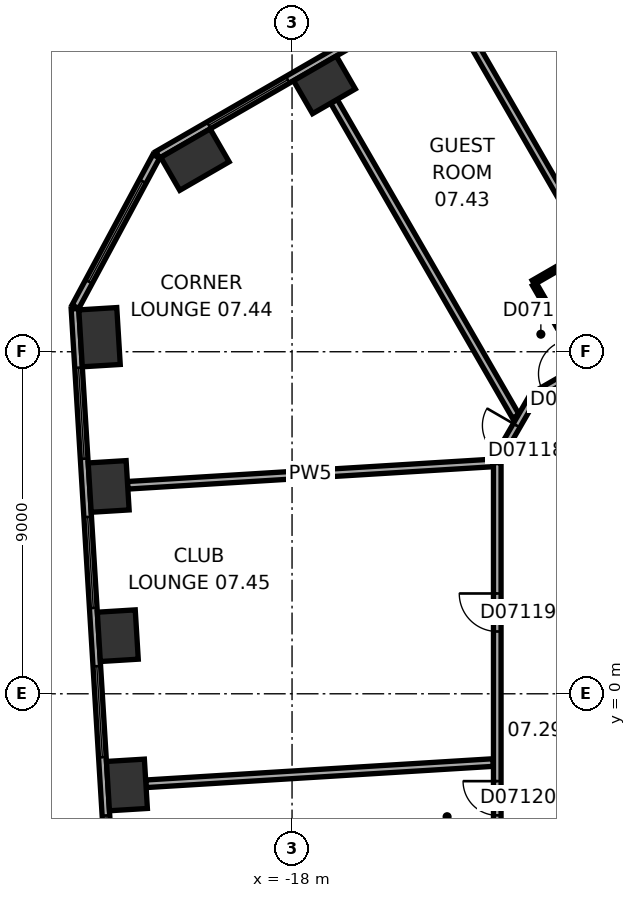
"""IFC4 building model, lengths in metres.
Left out: names, types, materials, properties, quantities, classifications, styles, units other than length and angle.
Written with IfcOpenShell. Run it as: python <this file> out.ifc"""

import sys

from ifc_helpers import new_model, si_unit, direction, frame, frame_2d, origin, origin_2d, place, context, subcontext, project, spatial, rectangle, extrude, element, fill, save


model = new_model("IFC4")
c1 = context("Model", 3, precision=1e-05, world=origin(), true_north=direction((0.0, 1.0)))
c2 = subcontext(c1, "Body", "Model", "MODEL_VIEW")
j1 = project(units=[si_unit("LENGTHUNIT", "METRE"), si_unit("PLANEANGLEUNIT", "RADIAN")], contexts=[c1])
p1 = place(None, origin())
s1 = spatial("IfcSite", under=j1, at=p1, CompositionType="ELEMENT")
p2 = place(p1, origin())
s2 = spatial("IfcBuilding", under=s1, at=p2, CompositionType="ELEMENT")
p3 = place(p2, frame((0.0, 0.0, 44.0)))
s3 = spatial("IfcBuildingStorey", under=s2, at=p3, CompositionType="ELEMENT", Elevation=44.0)
p4 = place(p3, frame((-17.148, 16.023, 0.0), z_axis=(0.0, 0.0, 1.0), x_axis=(-0.866025403784, -0.5, 0.0)))
e1 = element("IfcColumn", 1, at=p4, inside=s3, PredefinedType="COLUMN", context=c2, shape_type="SweptSolid", body=[
    extrude(rectangle(XDim=1.3, YDim=1.0, at=origin_2d()), origin(), (0.0, 0.0, 1.0), 3.3),
])
for number, where, z_axis, x_axis in (
    (2, (-20.555, 14.055, 0.0), (0.0, 0.0, 1.0), (-0.866, -0.5, 0.0)),
    (3, (-23.066, 9.383, 0.0), (0.0, 0.0, 1.0), (0.061, -0.998, 0.0)),
):
    element("IfcColumn", number, at=place(p3, frame(where, z_axis=z_axis, x_axis=x_axis)), inside=s3, PredefinedType="COLUMN", context=c2, shape_type="SweptSolid", body=[
        extrude(rectangle(XDim=1.5, YDim=1.0, at=origin_2d()), origin(), (0.0, 0.0, 1.0), 3.3),
    ])
for number, where, z_axis, x_axis in (
    (4, (-22.826, 5.456, 0.0), (0.0, 0.0, 1.0), (0.061, -0.998, 0.0)),
    (5, (-22.585, 1.529, 0.0), (0.0, 0.0, 1.0), (0.061, -0.998, 0.0)),
    (6, (-22.345, -2.399, 0.0), (0.0, 0.0, 1.0), (0.061, -0.998, 0.0)),
):
    element("IfcColumn", number, at=place(p3, frame(where, z_axis=z_axis, x_axis=x_axis)), inside=s3, PredefinedType="COLUMN", context=c2, shape_type="SweptSolid", body=[
        extrude(rectangle(XDim=1.3, YDim=1.0, at=origin_2d()), origin(), (0.0, 0.0, 1.0), 3.3),
    ])
p5 = place(p3, frame((-3.136, 24.805, 0.0), z_axis=(0.0, 0.0, 1.0), x_axis=(-0.866028291626, -0.499994998079, 0.0)))
e7 = element("IfcWall", 7, at=p5, inside=s3, PredefinedType="STANDARD", context=c2, shape_type="SweptSolid", body=[
    extrude(rectangle(XDim=21.246, YDim=0.2, at=frame_2d((10.623, 0.0))), origin(), (0.0, 0.0, 1.0), 3.3),
])
p6 = place(p5, frame((1.555, 0.0, 0.8)))
e8 = element("IfcOpeningElement", 8, at=p6, cuts=e7, PredefinedType="OPENING", context=c2, shape_type="SweptSolid", body=[
    extrude(rectangle(XDim=2.4, YDim=1.7, at=frame_2d((1.2, 0.85))), frame((0.0, 0.11, 0.0), z_axis=(0.0, -1.0, 0.0), x_axis=(1.0, 0.0, 0.0)), (0.0, 0.0, 1.0), 0.22),
])
p7 = place(p5, frame((5.489, 0.0, 0.8)))
e9 = element("IfcOpeningElement", 9, at=p7, cuts=e7, PredefinedType="OPENING", context=c2, shape_type="SweptSolid", body=[
    extrude(rectangle(XDim=2.4, YDim=1.7, at=frame_2d((1.2, 0.85))), frame((0.0, 0.11, 0.0), z_axis=(0.0, -1.0, 0.0), x_axis=(1.0, 0.0, 0.0)), (0.0, 0.0, 1.0), 0.22),
])
p8 = place(p5, frame((9.424, 0.0, 0.8)))
e10 = element("IfcOpeningElement", 10, at=p8, cuts=e7, PredefinedType="OPENING", context=c2, shape_type="SweptSolid", body=[
    extrude(rectangle(XDim=2.4, YDim=1.7, at=frame_2d((1.2, 0.85))), frame((0.0, 0.11, 0.0), z_axis=(0.0, -1.0, 0.0), x_axis=(1.0, 0.0, 0.0)), (0.0, 0.0, 1.0), 0.22),
])
p9 = place(p5, frame((13.358, 0.0, 0.8)))
e11 = element("IfcOpeningElement", 11, at=p9, cuts=e7, PredefinedType="OPENING", context=c2, shape_type="SweptSolid", body=[
    extrude(rectangle(XDim=2.4, YDim=1.7, at=frame_2d((1.2, 0.85))), frame((0.0, 0.11, 0.0), z_axis=(0.0, -1.0, 0.0), x_axis=(1.0, 0.0, 0.0)), (0.0, 0.0, 1.0), 0.22),
])
p10 = place(p5, frame((17.293, 0.0, 0.8)))
e12 = element("IfcOpeningElement", 12, at=p10, cuts=e7, PredefinedType="OPENING", context=c2, shape_type="SweptSolid", body=[
    extrude(rectangle(XDim=2.4, YDim=1.7, at=frame_2d((1.2, 0.85))), frame((0.0, 0.11, 0.0), z_axis=(0.0, -1.0, 0.0), x_axis=(1.0, 0.0, 0.0)), (0.0, 0.0, 1.0), 0.22),
])
p11 = place(p3, frame((-21.574, 14.143, 0.0), z_axis=(0.0, 0.0, 1.0), x_axis=(-0.473292949472, -0.880905093628, 0.0)))
e13 = element("IfcWall", 13, at=p11, inside=s3, PredefinedType="STANDARD", context=c2, shape_type="SweptSolid", body=[
    extrude(rectangle(XDim=4.494, YDim=0.2, at=frame_2d((2.247, 0.0))), origin(), (0.0, 0.0, 1.0), 3.3),
])
p12 = place(p11, frame((0.747, 0.0, 0.8)))
e14 = element("IfcOpeningElement", 14, at=p12, cuts=e13, PredefinedType="OPENING", context=c2, shape_type="SweptSolid", body=[
    extrude(rectangle(XDim=3.0, YDim=1.7, at=frame_2d((1.5, 0.85))), frame((0.0, 0.11, 0.0), z_axis=(0.0, -1.0, 0.0), x_axis=(1.0, 0.0, 0.0)), (0.0, 0.0, 1.0), 0.22),
])
p13 = place(p3, frame((-23.713, 10.131, 0.0), z_axis=(0.0, 0.0, 1.0), x_axis=(0.061040439785, -0.998135293791, 0.0)))
e15 = element("IfcWall", 15, at=p13, inside=s3, PredefinedType="STANDARD", context=c2, shape_type="SweptSolid", body=[
    extrude(rectangle(XDim=21.246, YDim=0.2, at=frame_2d((10.623, 0.0))), origin(), (0.0, 0.0, 1.0), 3.3),
])
p14 = place(p13, frame((1.553, 0.0, 0.8)))
e16 = element("IfcOpeningElement", 16, at=p14, cuts=e15, PredefinedType="OPENING", context=c2, shape_type="SweptSolid", body=[
    extrude(rectangle(XDim=2.4, YDim=1.7, at=frame_2d((1.2, 0.85))), frame((0.0, 0.11, 0.0), z_axis=(0.0, -1.0, 0.0), x_axis=(1.0, 0.0, 0.0)), (0.0, 0.0, 1.0), 0.22),
])
p15 = place(p13, frame((5.488, 0.0, 0.8)))
e17 = element("IfcOpeningElement", 17, at=p15, cuts=e15, PredefinedType="OPENING", context=c2, shape_type="SweptSolid", body=[
    extrude(rectangle(XDim=2.4, YDim=1.7, at=frame_2d((1.2, 0.85))), frame((0.0, 0.11, 0.0), z_axis=(0.0, -1.0, 0.0), x_axis=(1.0, 0.0, 0.0)), (0.0, 0.0, 1.0), 0.22),
])
p16 = place(p13, frame((9.422, 0.0, 0.8)))
e18 = element("IfcOpeningElement", 18, at=p16, cuts=e15, PredefinedType="OPENING", context=c2, shape_type="SweptSolid", body=[
    extrude(rectangle(XDim=2.4, YDim=1.7, at=frame_2d((1.2, 0.85))), frame((0.0, 0.11, 0.0), z_axis=(0.0, -1.0, 0.0), x_axis=(1.0, 0.0, 0.0)), (0.0, 0.0, 1.0), 0.22),
])
p17 = place(p13, frame((13.357, 0.0, 0.8)))
e19 = element("IfcOpeningElement", 19, at=p17, cuts=e15, PredefinedType="OPENING", context=c2, shape_type="SweptSolid", body=[
    extrude(rectangle(XDim=2.4, YDim=1.7, at=frame_2d((1.2, 0.85))), frame((0.0, 0.11, 0.0), z_axis=(0.0, -1.0, 0.0), x_axis=(1.0, 0.0, 0.0)), (0.0, 0.0, 1.0), 0.22),
])
p18 = place(p13, frame((17.292, 0.0, 0.8)))
e20 = element("IfcOpeningElement", 20, at=p18, cuts=e15, PredefinedType="OPENING", context=c2, shape_type="SweptSolid", body=[
    extrude(rectangle(XDim=2.4, YDim=1.7, at=frame_2d((1.2, 0.85))), frame((0.0, 0.11, 0.0), z_axis=(0.0, -1.0, 0.0), x_axis=(1.0, 0.0, 0.0)), (0.0, 0.0, 1.0), 0.22),
])
p19 = place(p3, frame((-22.327, 5.486, 0.0), z_axis=(0.0, 0.0, 1.0), x_axis=(0.998135194863, 0.061042057435, 0.0)))
e21 = element("IfcWall", 21, at=p19, inside=s3, PredefinedType="PARTITIONING", context=c2, shape_type="SweptSolid", body=[
    extrude(rectangle(XDim=9.635, YDim=0.2, at=frame_2d((4.817, 0.0))), origin(), (0.0, 0.0, 1.0), 3.05),
])
p20 = place(p3, frame((-21.846, -2.368, 0.0), z_axis=(0.0, 0.0, 1.0), x_axis=(0.998134617584, 0.061051496129, 0.0)))
e22 = element("IfcWall", 22, at=p20, inside=s3, PredefinedType="PARTITIONING", context=c2, shape_type="SweptSolid", body=[
    extrude(rectangle(XDim=9.154, YDim=0.2, at=frame_2d((4.577, 0.0))), origin(), (0.0, 0.0, 1.0), 3.05),
])
p21 = place(p3, frame((-16.898, 15.59, 0.0), z_axis=(0.0, 0.0, 1.0), x_axis=(0.500023458698, -0.866011859475, 0.0)))
e23 = element("IfcWall", 23, at=p21, inside=s3, PredefinedType="PARTITIONING", context=c2, shape_type="SweptSolid", body=[
    extrude(rectangle(XDim=9.572, YDim=0.2, at=frame_2d((4.786, 0.0))), origin(), (0.0, 0.0, 1.0), 3.05),
])
p22 = place(p3, frame((-12.6, 6.081, 0.0), z_axis=(0.0, 0.0, 1.0), x_axis=(0.0, -1.0, 0.0)))
e24 = element("IfcWall", 24, at=p22, inside=s3, PredefinedType="PARTITIONING", context=c2, shape_type="SweptSolid", body=[
    extrude(rectangle(XDim=12.219, YDim=0.2, at=frame_2d((6.109, 0.0))), origin(), (0.0, 0.0, 1.0), 3.05),
])
p23 = place(p22, frame((3.442, 0.0, 0.0)))
e25 = element("IfcOpeningElement", 25, at=p23, cuts=e24, PredefinedType="OPENING", context=c2, shape_type="SweptSolid", body=[
    extrude(rectangle(XDim=1.0, YDim=2.1, at=frame_2d((0.5, 1.05))), frame((0.0, 0.11, 0.0), z_axis=(0.0, -1.0, 0.0), x_axis=(1.0, 0.0, 0.0)), (0.0, 0.0, 1.0), 0.22),
])
p24 = place(p22, frame((8.38, 0.0, 0.0)))
e26 = element("IfcOpeningElement", 26, at=p24, cuts=e24, PredefinedType="OPENING", context=c2, shape_type="SweptSolid", body=[
    extrude(rectangle(XDim=0.9, YDim=2.1, at=frame_2d((0.45, 1.05))), frame((0.0, 0.11, 0.0), z_axis=(0.0, -1.0, 0.0), x_axis=(1.0, 0.0, 0.0)), (0.0, 0.0, 1.0), 0.22),
])
p25 = place(p3, frame((-11.65, 7.823, 0.0), z_axis=(0.0, 0.0, 1.0), x_axis=(-0.500063520245, -0.865988727248, 0.0)))
e27 = element("IfcWall", 27, at=p25, inside=s3, PredefinedType="PARTITIONING", context=c2, shape_type="SweptSolid", body=[
    extrude(rectangle(XDim=1.9, YDim=0.2, at=frame_2d((0.95, 0.0))), origin(), (0.0, 0.0, 1.0), 3.05),
])
p26 = place(p25, frame((0.882, 0.0, 0.0)))
e28 = element("IfcOpeningElement", 28, at=p26, cuts=e27, PredefinedType="OPENING", context=c2, shape_type="SweptSolid", body=[
    extrude(rectangle(XDim=0.9, YDim=2.1, at=frame_2d((0.45, 1.05))), frame((0.0, 0.11, 0.0), z_axis=(0.0, -1.0, 0.0), x_axis=(1.0, 0.0, 0.0)), (0.0, 0.0, 1.0), 0.22),
])
p27 = place(p3, frame((-11.651, 10.825, 0.0), z_axis=(0.0, 0.0, 1.0), x_axis=(0.865998477143, 0.500046635412, 0.0)))
e29 = element("IfcWall", 29, at=p27, inside=s3, PredefinedType="PARTITIONING", context=c2, shape_type="SweptSolid", body=[
    extrude(rectangle(XDim=1.673, YDim=0.12, at=frame_2d((0.836, 0.0))), origin(), (0.0, 0.0, 1.0), 3.05),
])
p28 = place(p3, frame((-10.401, 8.66, 0.0), z_axis=(0.0, 0.0, 1.0), x_axis=(-0.500077547548, 0.865980627057, 0.0)))
e30 = element("IfcWall", 30, at=p28, inside=s3, PredefinedType="PARTITIONING", context=c2, shape_type="SweptSolid", body=[
    extrude(rectangle(XDim=2.44, YDim=0.12, at=frame_2d((1.22, 0.0))), origin(), (0.0, 0.0, 1.0), 3.05),
])
p29 = place(p28, frame((0.77, 0.0, 0.0)))
e31 = element("IfcOpeningElement", 31, at=p29, cuts=e30, PredefinedType="OPENING", context=c2, shape_type="SweptSolid", body=[
    extrude(rectangle(XDim=0.9, YDim=2.1, at=frame_2d((0.45, 1.05))), frame((0.0, 0.07, 0.0), z_axis=(0.0, -1.0, 0.0), x_axis=(1.0, 0.0, 0.0)), (0.0, 0.0, 1.0), 0.14),
])
p30 = place(p3, frame((-8.902, 9.41, 0.0), z_axis=(0.0, 0.0, 1.0), x_axis=(-0.866014299198, -0.500019233215, 0.0)))
e32 = element("IfcWall", 32, at=p30, inside=s3, PredefinedType="PARTITIONING", context=c2, shape_type="SweptSolid", body=[
    extrude(rectangle(XDim=3.133, YDim=0.2, at=frame_2d((1.567, 0.0))), origin(), (0.0, 0.0, 1.0), 3.05),
])
p31 = place(p30, frame((1.978, 0.0, 0.0)))
e33 = element("IfcOpeningElement", 33, at=p31, cuts=e32, PredefinedType="OPENING", context=c2, shape_type="SweptSolid", body=[
    extrude(rectangle(XDim=0.9, YDim=2.1, at=frame_2d((0.45, 1.05))), frame((0.0, 0.11, 0.0), z_axis=(0.0, -1.0, 0.0), x_axis=(1.0, 0.0, 0.0)), (0.0, 0.0, 1.0), 0.22),
])
p32 = place(p3, frame((-7.865, 7.814, 0.0), z_axis=(0.0, 0.0, 1.0), x_axis=(-0.500004234368, 0.866022959057, 0.0)))
e34 = element("IfcWall", 34, at=p32, inside=s3, PredefinedType="PARTITIONING", context=c2, shape_type="SweptSolid", body=[
    extrude(rectangle(XDim=11.25, YDim=0.2, at=frame_2d((5.625, 0.0))), origin(), (0.0, 0.0, 1.0), 3.05),
])
p33 = place(p32, frame((0.5, 0.0, 0.0)))
e35 = element("IfcOpeningElement", 35, at=p33, cuts=e34, PredefinedType="OPENING", context=c2, shape_type="SweptSolid", body=[
    extrude(rectangle(XDim=0.9, YDim=2.1, at=frame_2d((0.45, 1.05))), frame((0.0, 0.11, 0.0), z_axis=(0.0, -1.0, 0.0), x_axis=(1.0, 0.0, 0.0)), (0.0, 0.0, 1.0), 0.22),
])
p34 = place(p10, origin())
e36 = element("IfcWindow", 36, at=p34, inside=s3, PartitioningType="SINGLE_PANEL", PredefinedType="WINDOW", context=c2, shape_type="SweptSolid", body=[
    extrude(rectangle(XDim=2.4, YDim=1.7, at=frame_2d((1.2, 0.85))), frame((0.0, 0.03, 0.0), z_axis=(0.0, -1.0, 0.0), x_axis=(1.0, 0.0, 0.0)), (0.0, 0.0, 1.0), 0.06),
])
fill(e12, e36)
p35 = place(p12, origin())
e37 = element("IfcWindow", 37, at=p35, inside=s3, PartitioningType="SINGLE_PANEL", PredefinedType="WINDOW", context=c2, shape_type="SweptSolid", body=[
    extrude(rectangle(XDim=3.0, YDim=1.7, at=frame_2d((1.5, 0.85))), frame((0.0, 0.03, 0.0), z_axis=(0.0, -1.0, 0.0), x_axis=(1.0, 0.0, 0.0)), (0.0, 0.0, 1.0), 0.06),
])
fill(e14, e37)
p36 = place(p14, origin())
e38 = element("IfcWindow", 38, at=p36, inside=s3, PartitioningType="SINGLE_PANEL", PredefinedType="WINDOW", context=c2, shape_type="SweptSolid", body=[
    extrude(rectangle(XDim=2.4, YDim=1.7, at=frame_2d((1.2, 0.85))), frame((0.0, 0.03, 0.0), z_axis=(0.0, -1.0, 0.0), x_axis=(1.0, 0.0, 0.0)), (0.0, 0.0, 1.0), 0.06),
])
fill(e16, e38)
p37 = place(p15, origin())
e39 = element("IfcWindow", 39, at=p37, inside=s3, PartitioningType="SINGLE_PANEL", PredefinedType="WINDOW", context=c2, shape_type="SweptSolid", body=[
    extrude(rectangle(XDim=2.4, YDim=1.7, at=frame_2d((1.2, 0.85))), frame((0.0, 0.03, 0.0), z_axis=(0.0, -1.0, 0.0), x_axis=(1.0, 0.0, 0.0)), (0.0, 0.0, 1.0), 0.06),
])
fill(e17, e39)
p38 = place(p16, origin())
e40 = element("IfcWindow", 40, at=p38, inside=s3, PartitioningType="SINGLE_PANEL", PredefinedType="WINDOW", context=c2, shape_type="SweptSolid", body=[
    extrude(rectangle(XDim=2.4, YDim=1.7, at=frame_2d((1.2, 0.85))), frame((0.0, 0.03, 0.0), z_axis=(0.0, -1.0, 0.0), x_axis=(1.0, 0.0, 0.0)), (0.0, 0.0, 1.0), 0.06),
])
fill(e18, e40)
p39 = place(p17, origin())
e41 = element("IfcWindow", 41, at=p39, inside=s3, PartitioningType="SINGLE_PANEL", PredefinedType="WINDOW", context=c2, shape_type="SweptSolid", body=[
    extrude(rectangle(XDim=2.4, YDim=1.7, at=frame_2d((1.2, 0.85))), frame((0.0, 0.03, 0.0), z_axis=(0.0, -1.0, 0.0), x_axis=(1.0, 0.0, 0.0)), (0.0, 0.0, 1.0), 0.06),
])
fill(e19, e41)
p40 = place(p31, origin())
e42 = element("IfcDoor", 42, at=p40, inside=s3, OperationType="SINGLE_SWING_LEFT", PredefinedType="DOOR", context=c2, shape_type="SweptSolid", body=[
    extrude(rectangle(XDim=0.9, YDim=2.1, at=frame_2d((0.45, 1.05))), frame((0.0, 0.025, 0.0), z_axis=(0.0, -1.0, 0.0), x_axis=(1.0, 0.0, 0.0)), (0.0, 0.0, 1.0), 0.05),
])
fill(e33, e42)
p41 = place(p29, origin())
e43 = element("IfcDoor", 43, at=p41, inside=s3, OperationType="SINGLE_SWING_LEFT", PredefinedType="DOOR", context=c2, shape_type="SweptSolid", body=[
    extrude(rectangle(XDim=0.9, YDim=2.1, at=frame_2d((0.45, 1.05))), frame((0.0, 0.025, 0.0), z_axis=(0.0, -1.0, 0.0), x_axis=(1.0, 0.0, 0.0)), (0.0, 0.0, 1.0), 0.05),
])
fill(e31, e43)
p42 = place(p26, origin())
e44 = element("IfcDoor", 44, at=p42, inside=s3, OperationType="SINGLE_SWING_LEFT", PredefinedType="DOOR", context=c2, shape_type="SweptSolid", body=[
    extrude(rectangle(XDim=0.9, YDim=2.1, at=frame_2d((0.45, 1.05))), frame((0.0, 0.025, 0.0), z_axis=(0.0, -1.0, 0.0), x_axis=(1.0, 0.0, 0.0)), (0.0, 0.0, 1.0), 0.05),
])
fill(e28, e44)
p43 = place(p23, origin())
e45 = element("IfcDoor", 45, at=p43, inside=s3, OperationType="SINGLE_SWING_LEFT", PredefinedType="DOOR", context=c2, shape_type="SweptSolid", body=[
    extrude(rectangle(XDim=1.0, YDim=2.1, at=frame_2d((0.5, 1.05))), frame((0.0, 0.025, 0.0), z_axis=(0.0, -1.0, 0.0), x_axis=(1.0, 0.0, 0.0)), (0.0, 0.0, 1.0), 0.05),
])
fill(e25, e45)
p44 = place(p24, origin())
e46 = element("IfcDoor", 46, at=p44, inside=s3, OperationType="SINGLE_SWING_LEFT", PredefinedType="DOOR", context=c2, shape_type="SweptSolid", body=[
    extrude(rectangle(XDim=0.9, YDim=2.1, at=frame_2d((0.45, 1.05))), frame((0.0, 0.025, 0.0), z_axis=(0.0, -1.0, 0.0), x_axis=(1.0, 0.0, 0.0)), (0.0, 0.0, 1.0), 0.05),
])
fill(e26, e46)
save(model, sys.argv[1])
